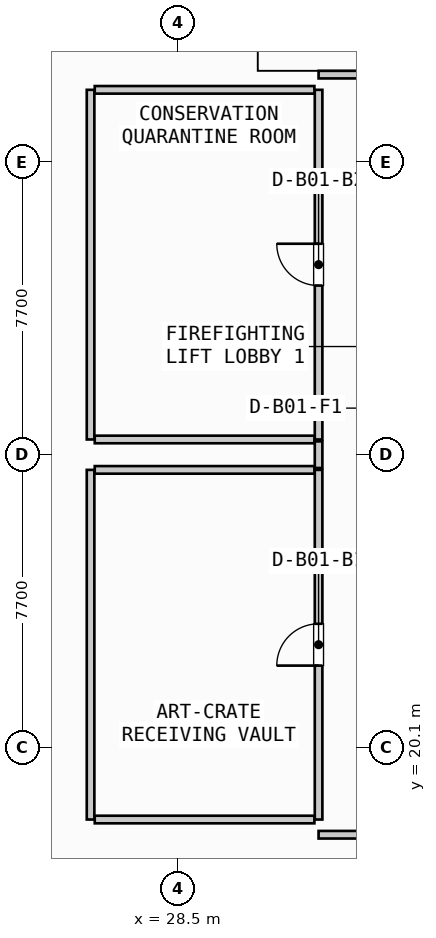
"""IFC4 building model, lengths in metres.
Left out: names, types, materials, properties, quantities, classifications, styles, units other than length and angle.
Written with IfcOpenShell. Run it as: python <this file> out.ifc"""

import sys

from ifc_helpers import new_model, si_unit, direction, frame, frame_2d, origin, place, context, subcontext, project, spatial, rectangle, extrude, source, transform, mapped, element, fill, save


model = new_model("IFC4")
c1 = context("Model", 3, precision=1e-05, world=origin(), true_north=direction((0.0, 1.0)))
c2 = subcontext(c1, "Body", "Model", "MODEL_VIEW")
j1 = project(units=[si_unit("LENGTHUNIT", "METRE"), si_unit("PLANEANGLEUNIT", "RADIAN")], contexts=[c1])
p1 = place(None, origin())
s1 = spatial("IfcSite", under=j1, at=p1, CompositionType="ELEMENT")
p2 = place(p1, origin())
s2 = spatial("IfcBuilding", under=s1, at=p2, CompositionType="ELEMENT")
p3 = place(p2, frame((0.0, 0.0, -4.5)))
s3 = spatial("IfcBuildingStorey", under=s2, at=p3, CompositionType="ELEMENT", Elevation=-4.5)
p4 = place(p3, frame((32.2, 18.2, 0.0), z_axis=(0.0, 0.0, 1.0), x_axis=(0.0, 1.0, 0.0)))
e1 = element("IfcWall", 1, at=p4, inside=s3, PredefinedType="PARTITIONING", context=c2, shape_type="SweptSolid", body=[
    extrude(rectangle(XDim=9.2, YDim=0.2, at=frame_2d((4.6, 0.0))), origin(), (0.0, 0.0, 1.0), 3.463),
])
p5 = place(p4, frame((4.05, 0.0, 0.0)))
e2 = element("IfcOpeningElement", 2, at=p5, cuts=e1, PredefinedType="OPENING", context=c2, shape_type="SweptSolid", body=[
    extrude(rectangle(XDim=1.1, YDim=2.15, at=frame_2d((0.55, 1.075))), frame((0.0, 0.11, 0.0), z_axis=(0.0, -1.0, 0.0), x_axis=(1.0, 0.0, 0.0)), (0.0, 0.0, 1.0), 0.22),
])
p6 = place(p3, frame((26.2, 18.2, 0.0), z_axis=(0.0, 0.0, 1.0), x_axis=(0.0, 1.0, 0.0)))
e3 = element("IfcWall", 3, at=p6, inside=s3, PredefinedType="PARTITIONING", context=c2, shape_type="SweptSolid", body=[
    extrude(rectangle(XDim=9.2, YDim=0.2, at=frame_2d((4.6, 0.0))), origin(), (0.0, 0.0, 1.0), 3.463),
])
for number, where, z_axis, x_axis in (
    (4, (26.31, 18.2, 0.0), (0.0, 0.0, 1.0), (1.0, 0.0, 0.0)),
    (5, (26.31, 27.4, 0.0), (0.0, 0.0, 1.0), (1.0, 0.0, 0.0)),
):
    element("IfcWall", number, at=place(p3, frame(where, z_axis=z_axis, x_axis=x_axis)), inside=s3, PredefinedType="PARTITIONING", context=c2, shape_type="SweptSolid", body=[
        extrude(rectangle(XDim=5.78, YDim=0.2, at=frame_2d((2.89, 0.0))), origin(), (0.0, 0.0, 1.0), 3.463),
    ])
p7 = place(p3, frame((32.2, 28.2, 0.0), z_axis=(0.0, 0.0, 1.0), x_axis=(0.0, 1.0, 0.0)))
e6 = element("IfcWall", 6, at=p7, inside=s3, PredefinedType="PARTITIONING", context=c2, shape_type="SweptSolid", body=[
    extrude(rectangle(XDim=9.2, YDim=0.2, at=frame_2d((4.6, 0.0))), origin(), (0.0, 0.0, 1.0), 3.463),
])
p8 = place(p7, frame((4.05, 0.0, 0.0)))
e7 = element("IfcOpeningElement", 7, at=p8, cuts=e6, PredefinedType="OPENING", context=c2, shape_type="SweptSolid", body=[
    extrude(rectangle(XDim=1.1, YDim=2.15, at=frame_2d((0.55, 1.075))), frame((0.0, 0.11, 0.0), z_axis=(0.0, -1.0, 0.0), x_axis=(1.0, 0.0, 0.0)), (0.0, 0.0, 1.0), 0.22),
])
p9 = place(p3, frame((26.2, 28.2, 0.0), z_axis=(0.0, 0.0, 1.0), x_axis=(0.0, 1.0, 0.0)))
e8 = element("IfcWall", 8, at=p9, inside=s3, PredefinedType="PARTITIONING", context=c2, shape_type="SweptSolid", body=[
    extrude(rectangle(XDim=9.2, YDim=0.2, at=frame_2d((4.6, 0.0))), origin(), (0.0, 0.0, 1.0), 3.463),
])
for number, where, z_axis, x_axis in (
    (9, (26.31, 28.2, 0.0), (0.0, 0.0, 1.0), (1.0, 0.0, 0.0)),
    (10, (26.31, 37.4, 0.0), (0.0, 0.0, 1.0), (1.0, 0.0, 0.0)),
):
    element("IfcWall", number, at=place(p3, frame(where, z_axis=z_axis, x_axis=x_axis)), inside=s3, PredefinedType="PARTITIONING", context=c2, shape_type="SweptSolid", body=[
        extrude(rectangle(XDim=5.78, YDim=0.2, at=frame_2d((2.89, 0.0))), origin(), (0.0, 0.0, 1.0), 3.463),
    ])
p10 = place(p3, frame((32.2, 27.45, 0.0), z_axis=(0.0, 0.0, 1.0), x_axis=(0.0, 1.0, 0.0)))
e11 = element("IfcWall", 11, at=p10, inside=s3, PredefinedType="PARTITIONING", context=c2, shape_type="SweptSolid", body=[
    extrude(rectangle(XDim=0.7, YDim=0.2, at=frame_2d((0.35, 0.0))), origin(), (0.0, 0.0, 1.0), 3.463),
])
p11 = place(p3, frame((32.2, 17.8, 0.0), z_axis=(0.0, 0.0, 1.0), x_axis=(1.0, 0.0, 0.0)))
e12 = element("IfcWall", 12, at=p11, inside=s3, PredefinedType="PARTITIONING", context=c2, shape_type="SweptSolid", body=[
    extrude(rectangle(XDim=29.2, YDim=0.2, at=frame_2d((14.6, 0.0))), origin(), (0.0, 0.0, 1.0), 3.463),
])
p12 = place(p11, frame((13.85, 0.0, 0.0)))
e13 = element("IfcOpeningElement", 13, at=p12, cuts=e12, PredefinedType="OPENING", context=c2, shape_type="SweptSolid", body=[
    extrude(rectangle(XDim=1.5, YDim=2.2, at=frame_2d((0.75, 1.1))), frame((0.0, 0.11, 0.0), z_axis=(0.0, -1.0, 0.0), x_axis=(1.0, 0.0, 0.0)), (0.0, 0.0, 1.0), 0.22),
])
p13 = place(p3, frame((32.2, 37.8, 0.0), z_axis=(0.0, 0.0, 1.0), x_axis=(1.0, 0.0, 0.0)))
e14 = element("IfcWall", 14, at=p13, inside=s3, PredefinedType="PARTITIONING", context=c2, shape_type="SweptSolid", body=[
    extrude(rectangle(XDim=29.2, YDim=0.2, at=frame_2d((14.6, 0.0))), origin(), (0.0, 0.0, 1.0), 3.463),
])
p14 = place(p13, frame((13.85, 0.0, 0.0)))
e15 = element("IfcOpeningElement", 15, at=p14, cuts=e14, PredefinedType="OPENING", context=c2, shape_type="SweptSolid", body=[
    extrude(rectangle(XDim=1.5, YDim=2.2, at=frame_2d((0.75, 1.1))), frame((0.0, 0.11, 0.0), z_axis=(0.0, -1.0, 0.0), x_axis=(1.0, 0.0, 0.0)), (0.0, 0.0, 1.0), 0.22),
])
m1 = source(origin(), c2, "Body", "SweptSolid", [
    extrude(rectangle(XDim=1.1, YDim=2.15, at=frame_2d((0.55, 1.075))), frame((0.0, 0.025, 0.0), z_axis=(0.0, -1.0, 0.0), x_axis=(1.0, 0.0, 0.0)), (0.0, 0.0, 1.0), 0.05),
])
p15 = place(p5, origin())
e16 = element("IfcDoor", 16, at=p15, inside=s3, OperationType="SINGLE_SWING_LEFT", PredefinedType="DOOR", context=c2, shape_type="MappedRepresentation", body=[
    mapped(m1, transform((0.0, 0.0, 0.0), scale=1.0)),
])
fill(e2, e16)
p16 = place(p8, origin())
e17 = element("IfcDoor", 17, at=p16, inside=s3, OperationType="SINGLE_SWING_RIGHT", PredefinedType="DOOR", context=c2, shape_type="MappedRepresentation", body=[
    mapped(m1, transform((0.0, 0.0, 0.0), scale=1.0)),
])
fill(e7, e17)
save(model, sys.argv[1])
